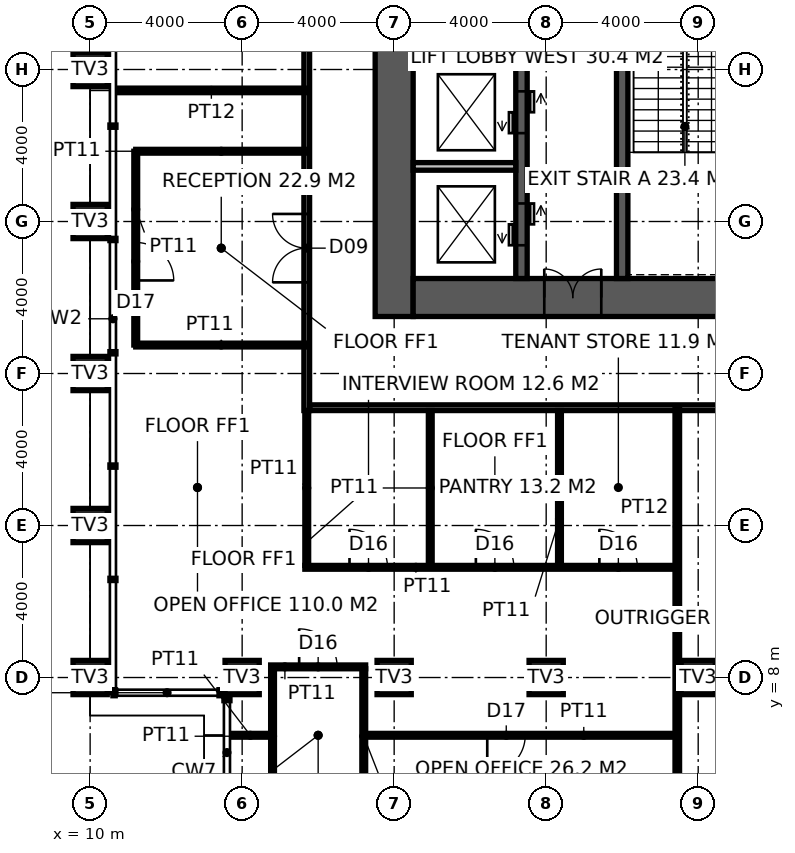
"""IFC4 building model, lengths in metres.
Left out: names, types, materials, properties, quantities, classifications, styles, units other than length and angle.
Written with IfcOpenShell. Run it as: python <this file> out.ifc"""

import sys

from ifc_helpers import new_model, si_unit, direction, frame, frame_2d, origin, origin_2d, place, context, subcontext, project, spatial, rectangle, hollow_rectangle, extrude, element, fill, save


model = new_model("IFC4")
c1 = context("Model", 3, precision=1e-05, world=origin(), true_north=direction((0.0, 1.0)))
c2 = subcontext(c1, "Body", "Model", "MODEL_VIEW")
j1 = project(units=[si_unit("LENGTHUNIT", "METRE"), si_unit("PLANEANGLEUNIT", "RADIAN")], contexts=[c1])
p1 = place(None, origin())
s1 = spatial("IfcSite", under=j1, at=p1, CompositionType="ELEMENT")
p2 = place(p1, origin())
s2 = spatial("IfcBuilding", under=s1, at=p2, CompositionType="ELEMENT")
p3 = place(p2, frame((0.0, 0.0, 238.2)))
s3 = spatial("IfcBuildingStorey", under=s2, at=p3, CompositionType="ELEMENT", Elevation=238.2)
for number, where, z_axis, x_axis in (
    (1, (10.0, 8.0, 0.0), (0.0, 0.0, 1.0), (1.0, 0.0, 0.0)),
    (2, (10.0, 12.0, 0.0), (0.0, 0.0, 1.0), (1.0, 0.0, 0.0)),
    (3, (10.0, 16.0, 0.0), (0.0, 0.0, 1.0), (1.0, 0.0, 0.0)),
    (4, (10.0, 20.0, 0.0), (0.0, 0.0, 1.0), (1.0, 0.0, 0.0)),
    (5, (10.0, 24.0, 0.0), (0.0, 0.0, 1.0), (1.0, 0.0, 0.0)),
    (6, (14.0, 8.0, 0.0), (0.0, 0.0, 1.0), (1.0, 0.0, 0.0)),
    (7, (18.0, 8.0, 0.0), (0.0, 0.0, 1.0), (1.0, 0.0, 0.0)),
    (8, (22.0, 8.0, 0.0), (0.0, 0.0, 1.0), (1.0, 0.0, 0.0)),
    (9, (26.0, 8.0, 0.0), (0.0, 0.0, 1.0), (1.0, 0.0, 0.0)),
):
    element("IfcColumn", number, at=place(p3, frame(where, z_axis=z_axis, x_axis=x_axis)), inside=s3, PredefinedType="USERDEFINED", context=c2, shape_type="SweptSolid", body=[
        extrude(hollow_rectangle(XDim=0.9, YDim=0.9, WallThickness=0.08, at=origin_2d()), origin(), (0.0, 0.0, 1.0), 4.0),
    ])
p4 = place(p3, frame((18.0, 17.5, -0.15), z_axis=(0.0, 0.0, 1.0), x_axis=(0.0, 1.0, 0.0)))
e10 = element("IfcWall", 10, at=p4, inside=s3, PredefinedType="SHEAR", context=c2, shape_type="SweptSolid", body=[
    extrude(rectangle(XDim=19.0, YDim=1.0, at=frame_2d((9.5, 0.0))), origin(), (0.0, 0.0, 1.0), 4.0),
])
p5 = place(p3, frame((18.5, 18.0, -0.15), z_axis=(0.0, 0.0, 1.0), x_axis=(1.0, 0.0, 0.0)))
e11 = element("IfcWall", 11, at=p5, inside=s3, PredefinedType="SHEAR", context=c2, shape_type="SweptSolid", body=[
    extrude(rectangle(XDim=17.6, YDim=1.0, at=frame_2d((8.8, 0.0))), origin(), (0.0, 0.0, 1.0), 4.0),
])
p6 = place(p5, frame((3.45, 0.0, 0.15)))
e12 = element("IfcOpeningElement", 12, at=p6, cuts=e11, PredefinedType="OPENING", context=c2, shape_type="SweptSolid", body=[
    extrude(rectangle(XDim=1.5, YDim=2.4, at=frame_2d((0.75, 1.2))), frame((0.0, 0.51, 0.0), z_axis=(0.0, -1.0, 0.0), x_axis=(1.0, 0.0, 0.0)), (0.0, 0.0, 1.0), 1.02),
])
p7 = place(p3, frame((24.0, 18.5, -0.15), z_axis=(0.0, 0.0, 1.0), x_axis=(0.0, 1.0, 0.0)))
e13 = element("IfcWall", 13, at=p7, inside=s3, PredefinedType="SHEAR", context=c2, shape_type="SweptSolid", body=[
    extrude(rectangle(XDim=17.0, YDim=0.3, at=frame_2d((8.5, 0.0))), origin(), (0.0, 0.0, 1.0), 4.0),
])
p8 = place(p7, frame((9.6, 0.0, 0.15)))
e14 = element("IfcOpeningElement", 14, at=p8, cuts=e13, PredefinedType="OPENING", context=c2, shape_type="SweptSolid", body=[
    extrude(rectangle(XDim=1.5, YDim=2.4, at=frame_2d((0.75, 1.2))), frame((0.0, 0.16, 0.0), z_axis=(0.0, -1.0, 0.0), x_axis=(1.0, 0.0, 0.0)), (0.0, 0.0, 1.0), 0.32),
])
p9 = place(p3, frame((21.35, 18.5, -0.15), z_axis=(0.0, 0.0, 1.0), x_axis=(0.0, 1.0, 0.0)))
e15 = element("IfcWall", 15, at=p9, inside=s3, PredefinedType="SHEAR", context=c2, shape_type="SweptSolid", body=[
    extrude(rectangle(XDim=12.5, YDim=0.3, at=frame_2d((6.25, 0.0))), origin(), (0.0, 0.0, 1.0), 4.0),
])
p10 = place(p9, frame((0.875, 0.0, 0.15)))
e16 = element("IfcOpeningElement", 16, at=p10, cuts=e15, PredefinedType="OPENING", context=c2, shape_type="SweptSolid", body=[
    extrude(rectangle(XDim=1.1, YDim=2.2, at=frame_2d((0.55, 1.1))), frame((0.0, 0.16, 0.0), z_axis=(0.0, -1.0, 0.0), x_axis=(1.0, 0.0, 0.0)), (0.0, 0.0, 1.0), 0.32),
])
p11 = place(p9, frame((3.825, 0.0, 0.15)))
e17 = element("IfcOpeningElement", 17, at=p11, cuts=e15, PredefinedType="OPENING", context=c2, shape_type="SweptSolid", body=[
    extrude(rectangle(XDim=1.1, YDim=2.2, at=frame_2d((0.55, 1.1))), frame((0.0, 0.16, 0.0), z_axis=(0.0, -1.0, 0.0), x_axis=(1.0, 0.0, 0.0)), (0.0, 0.0, 1.0), 0.32),
])
p12 = place(p9, frame((6.675, 0.0, 0.15)))
e18 = element("IfcOpeningElement", 18, at=p12, cuts=e15, PredefinedType="OPENING", context=c2, shape_type="SweptSolid", body=[
    extrude(rectangle(XDim=1.1, YDim=2.2, at=frame_2d((0.55, 1.1))), frame((0.0, 0.16, 0.0), z_axis=(0.0, -1.0, 0.0), x_axis=(1.0, 0.0, 0.0)), (0.0, 0.0, 1.0), 0.32),
])
p13 = place(p9, frame((9.575, 0.0, 0.15)))
e19 = element("IfcOpeningElement", 19, at=p13, cuts=e15, PredefinedType="OPENING", context=c2, shape_type="SweptSolid", body=[
    extrude(rectangle(XDim=1.1, YDim=2.2, at=frame_2d((0.55, 1.1))), frame((0.0, 0.16, 0.0), z_axis=(0.0, -1.0, 0.0), x_axis=(1.0, 0.0, 0.0)), (0.0, 0.0, 1.0), 0.32),
])
for number, where, z_axis, x_axis in (
    (20, (18.5, 21.45, -0.15), (0.0, 0.0, 1.0), (1.0, 0.0, 0.0)),
    (21, (18.5, 24.3, -0.15), (0.0, 0.0, 1.0), (1.0, 0.0, 0.0)),
):
    element("IfcWall", number, at=place(p3, frame(where, z_axis=z_axis, x_axis=x_axis)), inside=s3, PredefinedType="SOLIDWALL", context=c2, shape_type="SweptSolid", body=[
        extrude(rectangle(XDim=2.7, YDim=0.2, at=frame_2d((1.35, 0.0))), origin(), (0.0, 0.0, 1.0), 4.0),
    ])
p14 = place(p3, frame((15.7, 15.025, 0.0), z_axis=(0.0, 0.0, 1.0), x_axis=(0.0, 1.0, 0.0)))
e22 = element("IfcWall", 22, at=p14, inside=s3, PredefinedType="PARTITIONING", context=c2, shape_type="SweptSolid", body=[
    extrude(rectangle(XDim=23.35, YDim=0.15, at=frame_2d((11.675, 0.0))), origin(), (0.0, 0.0, 1.0), 3.85),
])
p15 = place(p14, frame((3.374, 0.0, 0.0)))
e23 = element("IfcOpeningElement", 23, at=p15, cuts=e22, PredefinedType="OPENING", context=c2, shape_type="SweptSolid", body=[
    extrude(rectangle(XDim=1.8, YDim=2.4, at=frame_2d((0.9, 1.2))), frame((0.0, 0.085, 0.0), z_axis=(0.0, -1.0, 0.0), x_axis=(1.0, 0.0, 0.0)), (0.0, 0.0, 1.0), 0.17),
])
p16 = place(p14, frame((17.476, 0.0, 0.0)))
e24 = element("IfcOpeningElement", 24, at=p16, cuts=e22, PredefinedType="OPENING", context=c2, shape_type="SweptSolid", body=[
    extrude(rectangle(XDim=1.8, YDim=2.4, at=frame_2d((0.9, 1.2))), frame((0.0, 0.085, 0.0), z_axis=(0.0, -1.0, 0.0), x_axis=(1.0, 0.0, 0.0)), (0.0, 0.0, 1.0), 0.17),
])
p17 = place(p14, frame((10.475, 0.0, 0.0)))
e25 = element("IfcOpeningElement", 25, at=p17, cuts=e22, PredefinedType="OPENING", context=c2, shape_type="SweptSolid", body=[
    extrude(rectangle(XDim=1.0, YDim=2.2, at=frame_2d((0.5, 1.1))), frame((0.0, 0.085, 0.0), z_axis=(0.0, -1.0, 0.0), x_axis=(1.0, 0.0, 0.0)), (0.0, 0.0, 1.0), 0.17),
])
p18 = place(p3, frame((15.775, 15.1, 0.0), z_axis=(0.0, 0.0, 1.0), x_axis=(1.0, 0.0, 0.0)))
e26 = element("IfcWall", 26, at=p18, inside=s3, PredefinedType="PARTITIONING", context=c2, shape_type="SweptSolid", body=[
    extrude(rectangle(XDim=22.65, YDim=0.15, at=frame_2d((11.325, 0.0))), origin(), (0.0, 0.0, 1.0), 3.85),
])
p19 = place(p18, frame((11.725, 0.0, 0.0)))
e27 = element("IfcOpeningElement", 27, at=p19, cuts=e26, PredefinedType="OPENING", context=c2, shape_type="SweptSolid", body=[
    extrude(rectangle(XDim=1.0, YDim=2.2, at=frame_2d((0.5, 1.1))), frame((0.0, 0.085, 0.0), z_axis=(0.0, -1.0, 0.0), x_axis=(1.0, 0.0, 0.0)), (0.0, 0.0, 1.0), 0.17),
])
p20 = place(p3, frame((25.45, 4.68, 0.0), z_axis=(0.0, 0.0, 1.0), x_axis=(0.0, 1.0, 0.0)))
e28 = element("IfcWall", 28, at=p20, inside=s3, PredefinedType="PARTITIONING", context=c2, shape_type="SweptSolid", body=[
    extrude(rectangle(XDim=10.42, YDim=0.12, at=frame_2d((5.21, 0.0))), origin(), (0.0, 0.0, 1.0), 3.85),
])
p21 = place(p3, frame((10.68, 23.45, 0.0), z_axis=(0.0, 0.0, 1.0), x_axis=(1.0, 0.0, 0.0)))
e29 = element("IfcWall", 29, at=p21, inside=s3, PredefinedType="PARTITIONING", context=c2, shape_type="SweptSolid", body=[
    extrude(rectangle(XDim=5.02, YDim=0.12, at=frame_2d((2.51, 0.0))), origin(), (0.0, 0.0, 1.0), 2.65),
])
p22 = place(p3, frame((14.75, 8.28, 0.0), z_axis=(0.0, 0.0, 1.0), x_axis=(1.0, 0.0, 0.0)))
e30 = element("IfcWall", 30, at=p22, inside=s3, PredefinedType="PARTITIONING", context=c2, shape_type="SweptSolid", body=[
    extrude(rectangle(XDim=2.5, YDim=0.1, at=frame_2d((1.25, 0.0))), origin(), (0.0, 0.0, 1.0), 3.85),
])
p23 = place(p22, frame((0.75, 0.0, 0.0)))
e31 = element("IfcOpeningElement", 31, at=p23, cuts=e30, PredefinedType="OPENING", context=c2, shape_type="SweptSolid", body=[
    extrude(rectangle(XDim=1.0, YDim=2.2, at=frame_2d((0.5, 1.1))), frame((0.0, 0.06, 0.0), z_axis=(0.0, -1.0, 0.0), x_axis=(1.0, 0.0, 0.0)), (0.0, 0.0, 1.0), 0.12),
])
p24 = place(p3, frame((15.65, 10.9, 0.0), z_axis=(0.0, 0.0, 1.0), x_axis=(1.0, 0.0, 0.0)))
e32 = element("IfcWall", 32, at=p24, inside=s3, PredefinedType="PARTITIONING", context=c2, shape_type="SweptSolid", body=[
    extrude(rectangle(XDim=9.739, YDim=0.1, at=frame_2d((4.87, 0.0))), origin(), (0.0, 0.0, 1.0), 3.85),
])
p25 = place(p24, frame((1.175, 0.0, 0.0)))
e33 = element("IfcOpeningElement", 33, at=p25, cuts=e32, PredefinedType="OPENING", context=c2, shape_type="SweptSolid", body=[
    extrude(rectangle(XDim=1.0, YDim=2.2, at=frame_2d((0.5, 1.1))), frame((0.0, 0.06, 0.0), z_axis=(0.0, -1.0, 0.0), x_axis=(1.0, 0.0, 0.0)), (0.0, 0.0, 1.0), 0.12),
])
p26 = place(p24, frame((4.5, 0.0, 0.0)))
e34 = element("IfcOpeningElement", 34, at=p26, cuts=e32, PredefinedType="OPENING", context=c2, shape_type="SweptSolid", body=[
    extrude(rectangle(XDim=1.0, YDim=2.2, at=frame_2d((0.5, 1.1))), frame((0.0, 0.06, 0.0), z_axis=(0.0, -1.0, 0.0), x_axis=(1.0, 0.0, 0.0)), (0.0, 0.0, 1.0), 0.12),
])
p27 = place(p24, frame((7.75, 0.0, 0.0)))
e35 = element("IfcOpeningElement", 35, at=p27, cuts=e32, PredefinedType="OPENING", context=c2, shape_type="SweptSolid", body=[
    extrude(rectangle(XDim=1.0, YDim=2.2, at=frame_2d((0.5, 1.1))), frame((0.0, 0.06, 0.0), z_axis=(0.0, -1.0, 0.0), x_axis=(1.0, 0.0, 0.0)), (0.0, 0.0, 1.0), 0.12),
])
p28 = place(p3, frame((14.8, 4.68, 0.0), z_axis=(0.0, 0.0, 1.0), x_axis=(0.0, 1.0, 0.0)))
e36 = element("IfcWall", 36, at=p28, inside=s3, PredefinedType="PARTITIONING", context=c2, shape_type="SweptSolid", body=[
    extrude(rectangle(XDim=3.55, YDim=0.1, at=frame_2d((1.775, 0.0))), origin(), (0.0, 0.0, 1.0), 3.85),
])
p29 = place(p3, frame((15.7, 10.95, 0.0), z_axis=(0.0, 0.0, 1.0), x_axis=(0.0, 1.0, 0.0)))
e37 = element("IfcWall", 37, at=p29, inside=s3, PredefinedType="PARTITIONING", context=c2, shape_type="SweptSolid", body=[
    extrude(rectangle(XDim=4.075, YDim=0.1, at=frame_2d((2.038, 0.0))), origin(), (0.0, 0.0, 1.0), 3.85),
])
p30 = place(p3, frame((17.2, 4.68, 0.0), z_axis=(0.0, 0.0, 1.0), x_axis=(0.0, 1.0, 0.0)))
e38 = element("IfcWall", 38, at=p30, inside=s3, PredefinedType="PARTITIONING", context=c2, shape_type="SweptSolid", body=[
    extrude(rectangle(XDim=3.55, YDim=0.1, at=frame_2d((1.775, 0.0))), origin(), (0.0, 0.0, 1.0), 3.85),
])
p31 = place(p3, frame((18.95, 10.95, 0.0), z_axis=(0.0, 0.0, 1.0), x_axis=(0.0, 1.0, 0.0)))
e39 = element("IfcWall", 39, at=p31, inside=s3, PredefinedType="PARTITIONING", context=c2, shape_type="SweptSolid", body=[
    extrude(rectangle(XDim=4.075, YDim=0.1, at=frame_2d((2.038, 0.0))), origin(), (0.0, 0.0, 1.0), 3.85),
])
p32 = place(p3, frame((22.35, 10.95, 0.0), z_axis=(0.0, 0.0, 1.0), x_axis=(0.0, 1.0, 0.0)))
e40 = element("IfcWall", 40, at=p32, inside=s3, PredefinedType="PARTITIONING", context=c2, shape_type="SweptSolid", body=[
    extrude(rectangle(XDim=4.075, YDim=0.1, at=frame_2d((2.038, 0.0))), origin(), (0.0, 0.0, 1.0), 2.95),
])
p33 = place(p3, frame((14.75, 6.48, 0.0), z_axis=(0.0, 0.0, 1.0), x_axis=(-1.0, 0.0, 0.0)))
e41 = element("IfcWall", 41, at=p33, inside=s3, PredefinedType="PARTITIONING", context=c2, shape_type="SweptSolid", body=[
    extrude(rectangle(XDim=1.07, YDim=0.1, at=frame_2d((0.535, 0.0))), origin(), (0.0, 0.0, 1.0), 3.85),
])
p34 = place(p3, frame((25.449, 6.48, 0.0), z_axis=(0.0, 0.0, 1.0), x_axis=(-1.0, 0.0, 0.0)))
e42 = element("IfcWall", 42, at=p34, inside=s3, PredefinedType="PARTITIONING", context=c2, shape_type="SweptSolid", body=[
    extrude(rectangle(XDim=8.199, YDim=0.1, at=frame_2d((4.1, 0.0))), origin(), (0.0, 0.0, 1.0), 3.85),
])
p35 = place(p34, frame((4.0, 0.0, 0.0)))
e43 = element("IfcOpeningElement", 43, at=p35, cuts=e42, PredefinedType="OPENING", context=c2, shape_type="SweptSolid", body=[
    extrude(rectangle(XDim=1.0, YDim=2.2, at=frame_2d((0.5, 1.1))), frame((0.0, 0.06, 0.0), z_axis=(0.0, -1.0, 0.0), x_axis=(1.0, 0.0, 0.0)), (0.0, 0.0, 1.0), 0.12),
])
p36 = place(p3, frame((15.7, 21.849, 0.0), z_axis=(0.0, 0.0, 1.0), x_axis=(-1.0, 0.0, 0.0)))
e44 = element("IfcWall", 44, at=p36, inside=s3, PredefinedType="PARTITIONING", context=c2, shape_type="SweptSolid", body=[
    extrude(rectangle(XDim=4.5, YDim=0.1, at=frame_2d((2.25, 0.0))), origin(), (0.0, 0.0, 1.0), 3.85),
])
p37 = place(p3, frame((11.2, 21.849, 0.0), z_axis=(0.0, 0.0, 1.0), x_axis=(0.0, -1.0, 0.0)))
e45 = element("IfcWall", 45, at=p37, inside=s3, PredefinedType="PARTITIONING", context=c2, shape_type="SweptSolid", body=[
    extrude(rectangle(XDim=5.1, YDim=0.1, at=frame_2d((2.55, 0.0))), origin(), (0.0, 0.0, 1.0), 3.85),
])
p38 = place(p37, frame((2.4, 0.0, 0.0)))
e46 = element("IfcOpeningElement", 46, at=p38, cuts=e45, PredefinedType="OPENING", context=c2, shape_type="SweptSolid", body=[
    extrude(rectangle(XDim=1.0, YDim=2.2, at=frame_2d((0.5, 1.1))), frame((0.0, 0.06, 0.0), z_axis=(0.0, -1.0, 0.0), x_axis=(1.0, 0.0, 0.0)), (0.0, 0.0, 1.0), 0.12),
])
p39 = place(p3, frame((11.2, 16.749, 0.0), z_axis=(0.0, 0.0, 1.0), x_axis=(1.0, 0.0, 0.0)))
e47 = element("IfcWall", 47, at=p39, inside=s3, PredefinedType="PARTITIONING", context=c2, shape_type="SweptSolid", body=[
    extrude(rectangle(XDim=4.5, YDim=0.1, at=frame_2d((2.25, 0.0))), origin(), (0.0, 0.0, 1.0), 3.85),
])
p40 = place(p6, origin())
e48 = element("IfcDoor", 48, at=p40, inside=s3, OperationType="DOUBLE_DOOR_DOUBLE_SWING", PredefinedType="DOOR", context=c2, shape_type="SweptSolid", body=[
    extrude(rectangle(XDim=1.5, YDim=2.4, at=frame_2d((0.75, 1.2))), frame((0.0, 0.025, 0.0), z_axis=(0.0, -1.0, 0.0), x_axis=(1.0, 0.0, 0.0)), (0.0, 0.0, 1.0), 0.05),
])
fill(e12, e48)
p41 = place(p15, origin())
e49 = element("IfcDoor", 49, at=p41, inside=s3, OperationType="DOUBLE_DOOR_DOUBLE_SWING", PredefinedType="DOOR", context=c2, shape_type="SweptSolid", body=[
    extrude(rectangle(XDim=1.8, YDim=2.4, at=frame_2d((0.9, 1.2))), frame((0.0, 0.025, 0.0), z_axis=(0.0, -1.0, 0.0), x_axis=(1.0, 0.0, 0.0)), (0.0, 0.0, 1.0), 0.05),
])
fill(e23, e49)
p42 = place(p25, origin())
e50 = element("IfcDoor", 50, at=p42, inside=s3, OperationType="SINGLE_SWING_LEFT", PredefinedType="DOOR", context=c2, shape_type="SweptSolid", body=[
    extrude(rectangle(XDim=1.0, YDim=2.2, at=frame_2d((0.5, 1.1))), frame((0.0, 0.025, 0.0), z_axis=(0.0, -1.0, 0.0), x_axis=(1.0, 0.0, 0.0)), (0.0, 0.0, 1.0), 0.05),
])
fill(e33, e50)
p43 = place(p26, origin())
e51 = element("IfcDoor", 51, at=p43, inside=s3, OperationType="SINGLE_SWING_LEFT", PredefinedType="DOOR", context=c2, shape_type="SweptSolid", body=[
    extrude(rectangle(XDim=1.0, YDim=2.2, at=frame_2d((0.5, 1.1))), frame((0.0, 0.025, 0.0), z_axis=(0.0, -1.0, 0.0), x_axis=(1.0, 0.0, 0.0)), (0.0, 0.0, 1.0), 0.05),
])
fill(e34, e51)
p44 = place(p27, origin())
e52 = element("IfcDoor", 52, at=p44, inside=s3, OperationType="SINGLE_SWING_LEFT", PredefinedType="DOOR", context=c2, shape_type="SweptSolid", body=[
    extrude(rectangle(XDim=1.0, YDim=2.2, at=frame_2d((0.5, 1.1))), frame((0.0, 0.025, 0.0), z_axis=(0.0, -1.0, 0.0), x_axis=(1.0, 0.0, 0.0)), (0.0, 0.0, 1.0), 0.05),
])
fill(e35, e52)
p45 = place(p23, origin())
e53 = element("IfcDoor", 53, at=p45, inside=s3, OperationType="SINGLE_SWING_LEFT", PredefinedType="DOOR", context=c2, shape_type="SweptSolid", body=[
    extrude(rectangle(XDim=1.0, YDim=2.2, at=frame_2d((0.5, 1.1))), frame((0.0, 0.025, 0.0), z_axis=(0.0, -1.0, 0.0), x_axis=(1.0, 0.0, 0.0)), (0.0, 0.0, 1.0), 0.05),
])
fill(e31, e53)
p46 = place(p35, origin())
e54 = element("IfcDoor", 54, at=p46, inside=s3, OperationType="SINGLE_SWING_RIGHT", PredefinedType="DOOR", context=c2, shape_type="SweptSolid", body=[
    extrude(rectangle(XDim=1.0, YDim=2.2, at=frame_2d((0.5, 1.1))), frame((0.0, 0.025, 0.0), z_axis=(0.0, -1.0, 0.0), x_axis=(1.0, 0.0, 0.0)), (0.0, 0.0, 1.0), 0.05),
])
fill(e43, e54)
p47 = place(p38, origin())
e55 = element("IfcDoor", 55, at=p47, inside=s3, OperationType="SINGLE_SWING_RIGHT", PredefinedType="DOOR", context=c2, shape_type="SweptSolid", body=[
    extrude(rectangle(XDim=1.0, YDim=2.2, at=frame_2d((0.5, 1.1))), frame((0.0, 0.025, 0.0), z_axis=(0.0, -1.0, 0.0), x_axis=(1.0, 0.0, 0.0)), (0.0, 0.0, 1.0), 0.05),
])
fill(e46, e55)
p48 = place(p10, origin())
e56 = element("IfcDoor", 56, at=p48, inside=s3, OperationType="DOUBLE_DOOR_SLIDING", PredefinedType="DOOR", context=c2, shape_type="SweptSolid", body=[
    extrude(rectangle(XDim=1.1, YDim=2.2, at=frame_2d((0.55, 1.1))), frame((0.0, 0.025, 0.0), z_axis=(0.0, -1.0, 0.0), x_axis=(1.0, 0.0, 0.0)), (0.0, 0.0, 1.0), 0.05),
])
fill(e16, e56)
p49 = place(p11, origin())
e57 = element("IfcDoor", 57, at=p49, inside=s3, OperationType="DOUBLE_DOOR_SLIDING", PredefinedType="DOOR", context=c2, shape_type="SweptSolid", body=[
    extrude(rectangle(XDim=1.1, YDim=2.2, at=frame_2d((0.55, 1.1))), frame((0.0, 0.025, 0.0), z_axis=(0.0, -1.0, 0.0), x_axis=(1.0, 0.0, 0.0)), (0.0, 0.0, 1.0), 0.05),
])
fill(e17, e57)
save(model, sys.argv[1])
